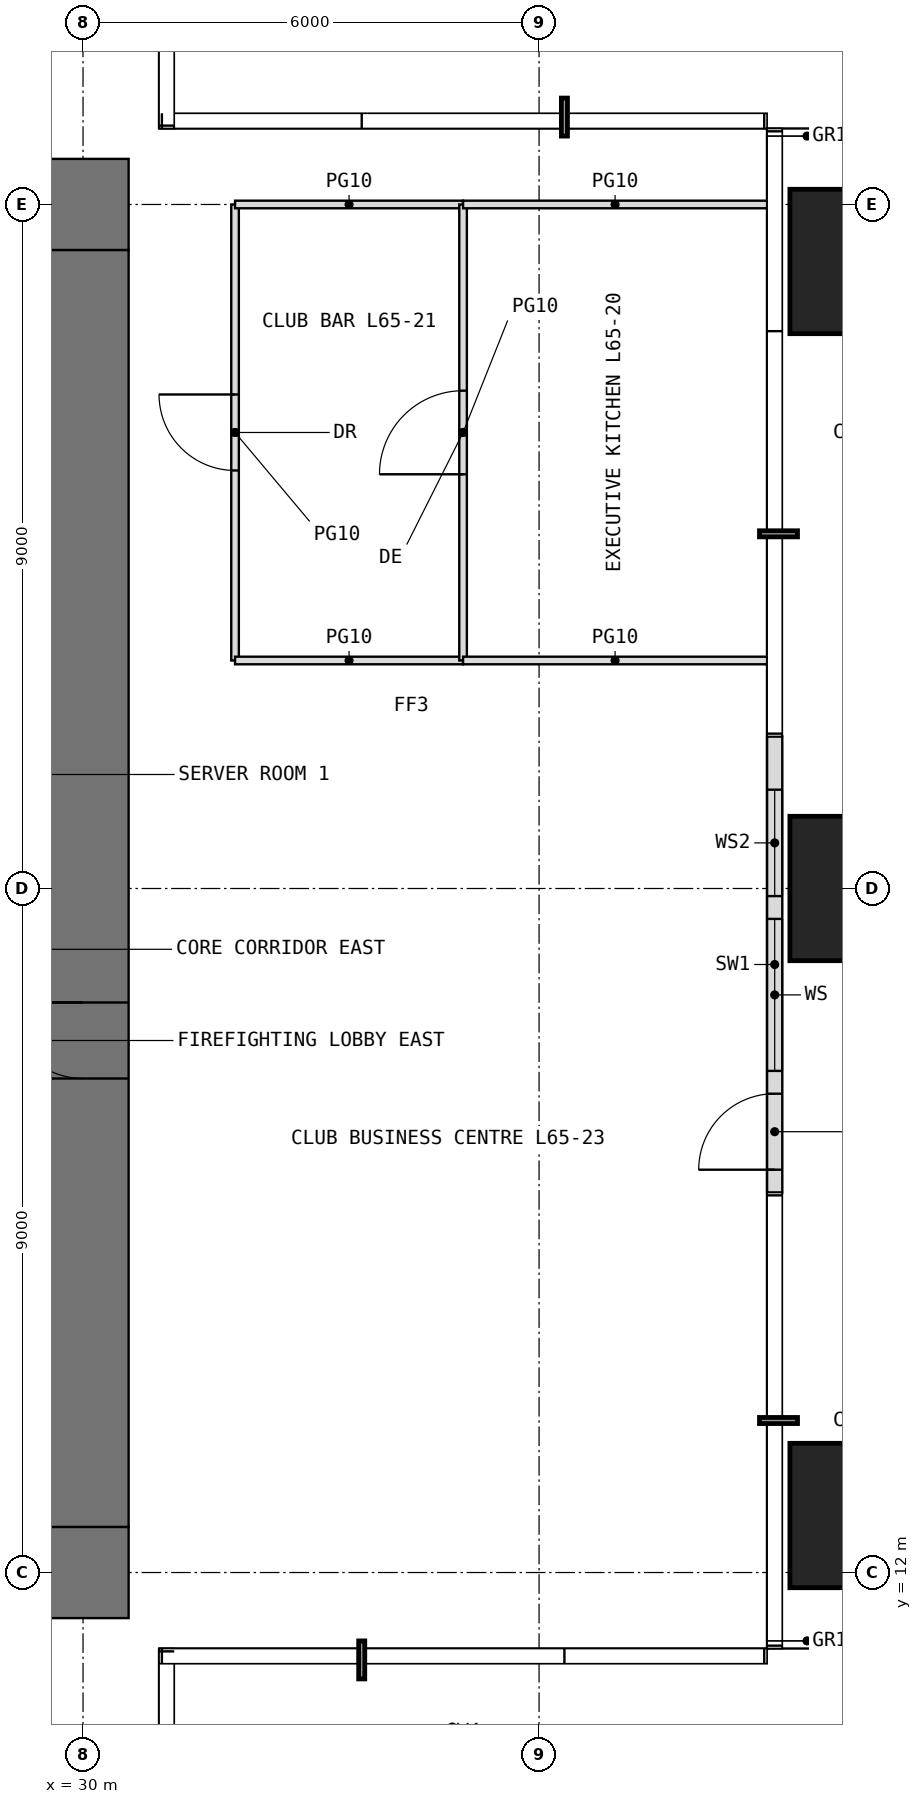
"""IFC4 building model, lengths in metres.
Left out: names, types, materials, properties, quantities, classifications, styles, units other than length and angle.
Written with IfcOpenShell. Run it as: python <this file> out.ifc"""

import sys

from ifc_helpers import new_model, si_unit, direction, frame, frame_2d, origin, origin_2d, place, context, subcontext, project, spatial, rectangle, extrude, element, fill, save


model = new_model("IFC4")
c1 = context("Model", 3, precision=1e-05, world=origin(), true_north=direction((0.0, 1.0)))
c2 = subcontext(c1, "Body", "Model", "MODEL_VIEW")
j1 = project(units=[si_unit("LENGTHUNIT", "METRE"), si_unit("PLANEANGLEUNIT", "RADIAN")], contexts=[c1])
p1 = place(None, origin())
s1 = spatial("IfcSite", under=j1, at=p1, CompositionType="ELEMENT")
p2 = place(p1, origin())
s2 = spatial("IfcBuilding", under=s1, at=p2, CompositionType="ELEMENT")
p3 = place(p2, frame((0.0, 0.0, 273.4)))
s3 = spatial("IfcBuildingStorey", under=s2, at=p3, CompositionType="ELEMENT", Elevation=273.4)
for number, where, z_axis, x_axis in (
    (1, (40.25, 12.75, 0.0), (0.0, 0.0, 1.0), (1.0, 0.0, 0.0)),
    (2, (40.25, 21.0, 0.0), (0.0, 0.0, 1.0), (1.0, 0.0, 0.0)),
    (3, (40.25, 29.25, 0.0), (0.0, 0.0, 1.0), (1.0, 0.0, 0.0)),
):
    element("IfcColumn", number, at=place(p3, frame(where, z_axis=z_axis, x_axis=x_axis)), inside=s3, PredefinedType="COLUMN", context=c2, shape_type="SweptSolid", body=[
        extrude(rectangle(XDim=1.9, YDim=1.9, at=origin_2d()), origin(), (0.0, 0.0, 1.0), 4.5),
    ])
p4 = place(p3, frame((39.1, 17.0, 0.0), z_axis=(0.0, 0.0, 1.0), x_axis=(0.0, 1.0, 0.0)))
e4 = element("IfcWall", 4, at=p4, inside=s3, PredefinedType="USERDEFINED", context=c2, shape_type="SweptSolid", body=[
    extrude(rectangle(XDim=6.0, YDim=0.2, at=frame_2d((3.0, 0.0))), origin(), (0.0, 0.0, 1.0), 4.2),
])
p5 = place(p4, frame((0.3, 0.0, 0.0)))
e5 = element("IfcOpeningElement", 5, at=p5, cuts=e4, PredefinedType="OPENING", context=c2, shape_type="SweptSolid", body=[
    extrude(rectangle(XDim=1.0, YDim=2.4, at=frame_2d((0.5, 1.2))), frame((0.0, 0.11, 0.0), z_axis=(0.0, -1.0, 0.0), x_axis=(1.0, 0.0, 0.0)), (0.0, 0.0, 1.0), 0.22),
])
p6 = place(p4, frame((1.6, 0.0, 0.3)))
e6 = element("IfcOpeningElement", 6, at=p6, cuts=e4, PredefinedType="OPENING", context=c2, shape_type="SweptSolid", body=[
    extrude(rectangle(XDim=2.0, YDim=2.7, at=frame_2d((1.0, 1.35))), frame((0.0, 0.11, 0.0), z_axis=(0.0, -1.0, 0.0), x_axis=(1.0, 0.0, 0.0)), (0.0, 0.0, 1.0), 0.22),
])
p7 = place(p4, frame((3.9, 0.0, 0.3)))
e7 = element("IfcOpeningElement", 7, at=p7, cuts=e4, PredefinedType="OPENING", context=c2, shape_type="SweptSolid", body=[
    extrude(rectangle(XDim=1.4, YDim=2.7, at=frame_2d((0.7, 1.35))), frame((0.0, 0.11, 0.0), z_axis=(0.0, -1.0, 0.0), x_axis=(1.0, 0.0, 0.0)), (0.0, 0.0, 1.0), 0.22),
])
p8 = place(p3, frame((11.4, 12.0, -0.05), z_axis=(0.0, 0.0, 1.0), x_axis=(1.0, 0.0, 0.0)))
e8 = element("IfcWall", 8, at=p8, inside=s3, PredefinedType="SHEAR", context=c2, shape_type="SweptSolid", body=[
    extrude(rectangle(XDim=19.2, YDim=1.2, at=frame_2d((9.6, 0.0))), origin(), (0.0, 0.0, 1.0), 4.45),
])
p9 = place(p8, frame((8.6, 0.0, 0.05)))
e9 = element("IfcOpeningElement", 9, at=p9, cuts=e8, PredefinedType="OPENING", context=c2, shape_type="SweptSolid", body=[
    extrude(rectangle(XDim=2.0, YDim=2.2, at=frame_2d((1.0, 1.1))), frame((0.0, 0.61, 0.0), z_axis=(0.0, -1.0, 0.0), x_axis=(1.0, 0.0, 0.0)), (0.0, 0.0, 1.0), 1.22),
])
p10 = place(p3, frame((11.4, 30.0, -0.05), z_axis=(0.0, 0.0, 1.0), x_axis=(1.0, 0.0, 0.0)))
e10 = element("IfcWall", 10, at=p10, inside=s3, PredefinedType="SHEAR", context=c2, shape_type="SweptSolid", body=[
    extrude(rectangle(XDim=19.2, YDim=1.2, at=frame_2d((9.6, 0.0))), origin(), (0.0, 0.0, 1.0), 4.45),
])
p11 = place(p10, frame((8.6, 0.0, 0.05)))
e11 = element("IfcOpeningElement", 11, at=p11, cuts=e10, PredefinedType="OPENING", context=c2, shape_type="SweptSolid", body=[
    extrude(rectangle(XDim=2.0, YDim=2.2, at=frame_2d((1.0, 1.1))), frame((0.0, 0.61, 0.0), z_axis=(0.0, -1.0, 0.0), x_axis=(1.0, 0.0, 0.0)), (0.0, 0.0, 1.0), 1.22),
])
p12 = place(p3, frame((30.0, 12.6, -0.05), z_axis=(0.0, 0.0, 1.0), x_axis=(0.0, 1.0, 0.0)))
e12 = element("IfcWall", 12, at=p12, inside=s3, PredefinedType="SHEAR", context=c2, shape_type="SweptSolid", body=[
    extrude(rectangle(XDim=16.8, YDim=1.2, at=frame_2d((8.4, 0.0))), origin(), (0.0, 0.0, 1.0), 4.45),
])
p13 = place(p12, frame((5.9, 0.0, 0.05)))
e13 = element("IfcOpeningElement", 13, at=p13, cuts=e12, PredefinedType="OPENING", context=c2, shape_type="SweptSolid", body=[
    extrude(rectangle(XDim=1.0, YDim=2.2, at=frame_2d((0.5, 1.1))), frame((0.0, 0.61, 0.0), z_axis=(0.0, -1.0, 0.0), x_axis=(1.0, 0.0, 0.0)), (0.0, 0.0, 1.0), 1.22),
])
p14 = place(p3, frame((32.0, 24.0, 0.0), z_axis=(0.0, 0.0, 1.0), x_axis=(0.0, 1.0, 0.0)))
e14 = element("IfcWall", 14, at=p14, inside=s3, PredefinedType="PARTITIONING", context=c2, shape_type="SweptSolid", body=[
    extrude(rectangle(XDim=6.0, YDim=0.1, at=frame_2d((3.0, 0.0))), origin(), (0.0, 0.0, 1.0), 4.2),
])
p15 = place(p14, frame((2.5, 0.0, 0.0)))
e15 = element("IfcOpeningElement", 15, at=p15, cuts=e14, PredefinedType="OPENING", context=c2, shape_type="SweptSolid", body=[
    extrude(rectangle(XDim=1.0, YDim=2.2, at=frame_2d((0.5, 1.1))), frame((0.0, 0.06, 0.0), z_axis=(0.0, -1.0, 0.0), x_axis=(1.0, 0.0, 0.0)), (0.0, 0.0, 1.0), 0.12),
])
for number, where, z_axis, x_axis in (
    (16, (32.0, 24.0, 0.0), (0.0, 0.0, 1.0), (1.0, 0.0, 0.0)),
    (17, (32.0, 30.0, 0.0), (0.0, 0.0, 1.0), (1.0, 0.0, 0.0)),
):
    element("IfcWall", number, at=place(p3, frame(where, z_axis=z_axis, x_axis=x_axis)), inside=s3, PredefinedType="PARTITIONING", context=c2, shape_type="SweptSolid", body=[
        extrude(rectangle(XDim=3.0, YDim=0.1, at=frame_2d((1.5, 0.0))), origin(), (0.0, 0.0, 1.0), 4.2),
    ])
p16 = place(p3, frame((35.0, 24.0, 0.0), z_axis=(0.0, 0.0, 1.0), x_axis=(0.0, 1.0, 0.0)))
e18 = element("IfcWall", 18, at=p16, inside=s3, PredefinedType="PARTITIONING", context=c2, shape_type="SweptSolid", body=[
    extrude(rectangle(XDim=6.0, YDim=0.1, at=frame_2d((3.0, 0.0))), origin(), (0.0, 0.0, 1.0), 4.2),
])
p17 = place(p16, frame((2.45, 0.0, 0.0)))
e19 = element("IfcOpeningElement", 19, at=p17, cuts=e18, PredefinedType="OPENING", context=c2, shape_type="SweptSolid", body=[
    extrude(rectangle(XDim=1.1, YDim=2.3, at=frame_2d((0.55, 1.15))), frame((0.0, 0.06, 0.0), z_axis=(0.0, -1.0, 0.0), x_axis=(1.0, 0.0, 0.0)), (0.0, 0.0, 1.0), 0.12),
])
for number, where, z_axis, x_axis in (
    (20, (35.0, 24.0, 0.0), (0.0, 0.0, 1.0), (1.0, 0.0, 0.0)),
    (21, (35.0, 30.0, 0.0), (0.0, 0.0, 1.0), (1.0, 0.0, 0.0)),
):
    element("IfcWall", number, at=place(p3, frame(where, z_axis=z_axis, x_axis=x_axis)), inside=s3, PredefinedType="PARTITIONING", context=c2, shape_type="SweptSolid", body=[
        extrude(rectangle(XDim=4.0, YDim=0.1, at=frame_2d((2.0, 0.0))), origin(), (0.0, 0.0, 1.0), 4.2),
    ])
p18 = place(p5, origin())
e22 = element("IfcDoor", 22, at=p18, inside=s3, OperationType="SINGLE_SWING_LEFT", PredefinedType="DOOR", context=c2, shape_type="SweptSolid", body=[
    extrude(rectangle(XDim=1.0, YDim=2.4, at=frame_2d((0.5, 1.2))), frame((0.0, 0.025, 0.0), z_axis=(0.0, -1.0, 0.0), x_axis=(1.0, 0.0, 0.0)), (0.0, 0.0, 1.0), 0.05),
])
fill(e5, e22)
p19 = place(p6, origin())
e23 = element("IfcWindow", 23, at=p19, inside=s3, PartitioningType="SINGLE_PANEL", PredefinedType="WINDOW", context=c2, shape_type="SweptSolid", body=[
    extrude(rectangle(XDim=2.0, YDim=2.7, at=frame_2d((1.0, 1.35))), frame((0.0, 0.03, 0.0), z_axis=(0.0, -1.0, 0.0), x_axis=(1.0, 0.0, 0.0)), (0.0, 0.0, 1.0), 0.06),
])
fill(e6, e23)
p20 = place(p7, origin())
e24 = element("IfcWindow", 24, at=p20, inside=s3, PartitioningType="SINGLE_PANEL", PredefinedType="WINDOW", context=c2, shape_type="SweptSolid", body=[
    extrude(rectangle(XDim=1.4, YDim=2.7, at=frame_2d((0.7, 1.35))), frame((0.0, 0.03, 0.0), z_axis=(0.0, -1.0, 0.0), x_axis=(1.0, 0.0, 0.0)), (0.0, 0.0, 1.0), 0.06),
])
fill(e7, e24)
p21 = place(p13, origin())
e25 = element("IfcDoor", 25, at=p21, inside=s3, OperationType="SINGLE_SWING_RIGHT", PredefinedType="DOOR", context=c2, shape_type="SweptSolid", body=[
    extrude(rectangle(XDim=1.0, YDim=2.2, at=frame_2d((0.5, 1.1))), frame((0.0, 0.025, 0.0), z_axis=(0.0, -1.0, 0.0), x_axis=(1.0, 0.0, 0.0)), (0.0, 0.0, 1.0), 0.05),
])
fill(e13, e25)
p22 = place(p17, origin())
e26 = element("IfcDoor", 26, at=p22, inside=s3, OperationType="SINGLE_SWING_LEFT", PredefinedType="DOOR", context=c2, shape_type="SweptSolid", body=[
    extrude(rectangle(XDim=1.1, YDim=2.3, at=frame_2d((0.55, 1.15))), frame((0.0, 0.025, 0.0), z_axis=(0.0, -1.0, 0.0), x_axis=(1.0, 0.0, 0.0)), (0.0, 0.0, 1.0), 0.05),
])
fill(e19, e26)
p23 = place(p15, origin())
e27 = element("IfcDoor", 27, at=p23, inside=s3, OperationType="SINGLE_SWING_RIGHT", PredefinedType="DOOR", context=c2, shape_type="SweptSolid", body=[
    extrude(rectangle(XDim=1.0, YDim=2.2, at=frame_2d((0.5, 1.1))), frame((0.0, 0.025, 0.0), z_axis=(0.0, -1.0, 0.0), x_axis=(1.0, 0.0, 0.0)), (0.0, 0.0, 1.0), 0.05),
])
fill(e15, e27)
save(model, sys.argv[1])
